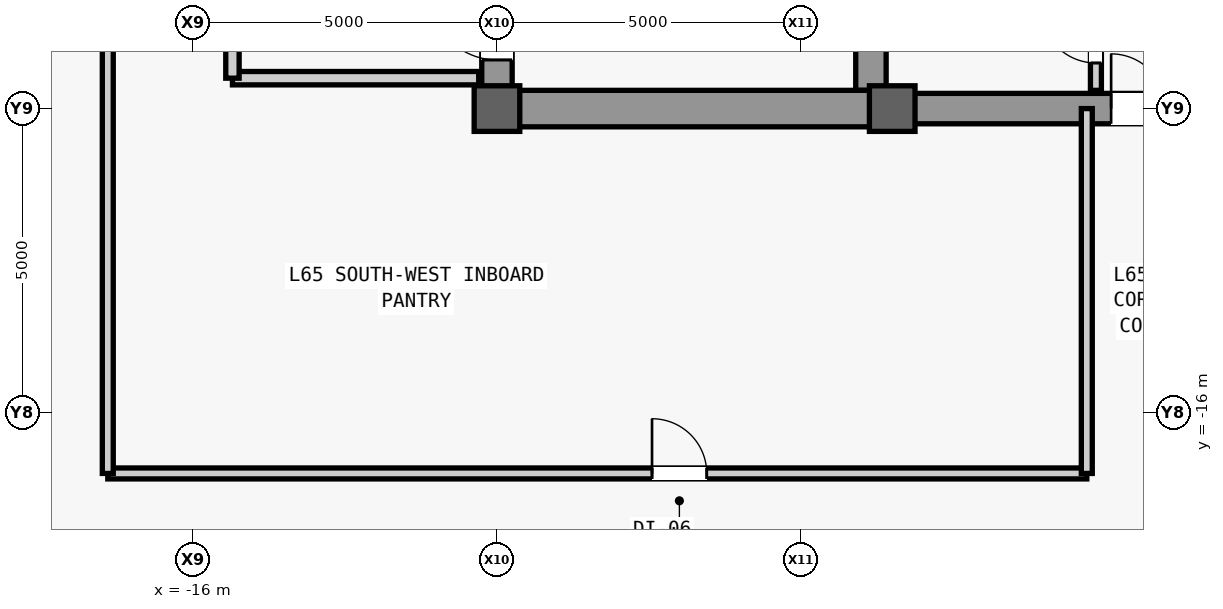
"""IFC4 building model, lengths in metres.
Left out: names, types, materials, properties, quantities, classifications, styles, units other than length and angle.
Written with IfcOpenShell. Run it as: python <this file> out.ifc"""

import sys

from ifc_helpers import new_model, si_unit, direction, frame, frame_2d, origin, origin_2d, place, context, subcontext, project, spatial, rectangle, extrude, source, transform, mapped, element, fill, save


model = new_model("IFC4")
c1 = context("Model", 3, precision=1e-05, world=origin(), true_north=direction((0.0, 1.0)))
c2 = subcontext(c1, "Body", "Model", "MODEL_VIEW")
j1 = project(units=[si_unit("LENGTHUNIT", "METRE"), si_unit("PLANEANGLEUNIT", "RADIAN")], contexts=[c1])
p1 = place(None, origin())
s1 = spatial("IfcSite", under=j1, at=p1, CompositionType="ELEMENT")
p2 = place(p1, origin())
s2 = spatial("IfcBuilding", under=s1, at=p2, CompositionType="ELEMENT")
p3 = place(p2, frame((0.0, 0.0, 277.5)))
s3 = spatial("IfcBuildingStorey", under=s2, at=p3, CompositionType="ELEMENT", Elevation=277.5)
m1 = source(origin(), c2, "Body", "SweptSolid", [
    extrude(rectangle(XDim=22.0, YDim=0.5, at=frame_2d((11.0, 0.0))), origin(), (0.0, 0.0, 1.0), 3.78),
])
p4 = place(p3, frame((-11.0, -11.0, 0.0), z_axis=(0.0, 0.0, 1.0), x_axis=(0.0, 1.0, 0.0)))
e1 = element("IfcWall", 1, at=p4, inside=s3, PredefinedType="SHEAR", context=c2, shape_type="MappedRepresentation", body=[
    mapped(m1, transform((0.0, 0.0, 0.0), scale=1.0)),
])
m2 = source(origin(), c2, "Body", "SweptSolid", [
    extrude(rectangle(XDim=1.1, YDim=2.2, at=frame_2d((0.55, 1.1))), frame((0.0, 0.26, 0.0), z_axis=(0.0, -1.0, 0.0), x_axis=(1.0, 0.0, 0.0)), (0.0, 0.0, 1.0), 0.52),
])
p5 = place(p4, frame((0.8, 0.0, 0.0)))
e2 = element("IfcOpeningElement", 2, at=p5, cuts=e1, PredefinedType="OPENING", context=c2, shape_type="MappedRepresentation", body=[
    mapped(m2, transform((0.0, 0.0, 0.0), scale=1.0)),
])
p6 = place(p4, frame((12.5, 0.0, 0.0)))
e3 = element("IfcOpeningElement", 3, at=p6, cuts=e1, PredefinedType="OPENING", context=c2, shape_type="MappedRepresentation", body=[
    mapped(m2, transform((0.0, 0.0, 0.0), scale=1.0)),
])
m3 = source(origin(), c2, "Body", "SweptSolid", [
    extrude(rectangle(XDim=0.9, YDim=2.15, at=frame_2d((0.45, 1.075))), frame((0.0, 0.26, 0.0), z_axis=(0.0, -1.0, 0.0), x_axis=(1.0, 0.0, 0.0)), (0.0, 0.0, 1.0), 0.52),
])
p7 = place(p4, frame((6.2, 0.0, 0.0)))
e4 = element("IfcOpeningElement", 4, at=p7, cuts=e1, PredefinedType="OPENING", context=c2, shape_type="MappedRepresentation", body=[
    mapped(m3, transform((0.0, 0.0, 0.0), scale=1.0)),
])
p8 = place(p4, frame((8.525, 0.0, 0.0)))
e5 = element("IfcOpeningElement", 5, at=p8, cuts=e1, PredefinedType="OPENING", context=c2, shape_type="MappedRepresentation", body=[
    mapped(m3, transform((0.0, 0.0, 0.0), scale=1.0)),
])
m4 = source(origin(), c2, "Body", "SweptSolid", [
    extrude(rectangle(XDim=1.2, YDim=2.3, at=frame_2d((0.6, 1.15))), frame((0.0, 0.26, 0.0), z_axis=(0.0, -1.0, 0.0), x_axis=(1.0, 0.0, 0.0)), (0.0, 0.0, 1.0), 0.52),
])
p9 = place(p4, frame((14.6, 0.0, 0.0)))
e6 = element("IfcOpeningElement", 6, at=p9, cuts=e1, PredefinedType="OPENING", context=c2, shape_type="MappedRepresentation", body=[
    mapped(m4, transform((0.0, 0.0, 0.0), scale=1.0)),
])
p10 = place(p4, frame((18.2, 0.0, 0.0)))
e7 = element("IfcOpeningElement", 7, at=p10, cuts=e1, PredefinedType="OPENING", context=c2, shape_type="MappedRepresentation", body=[
    mapped(m4, transform((0.0, 0.0, 0.0), scale=1.0)),
])
m5 = source(origin(), c2, "Body", "SweptSolid", [
    extrude(rectangle(XDim=1.3, YDim=2.3, at=frame_2d((0.65, 1.15))), frame((0.0, 0.26, 0.0), z_axis=(0.0, -1.0, 0.0), x_axis=(1.0, 0.0, 0.0)), (0.0, 0.0, 1.0), 0.52),
])
p11 = place(p4, frame((2.7, 0.0, 0.0)))
e8 = element("IfcOpeningElement", 8, at=p11, cuts=e1, PredefinedType="OPENING", context=c2, shape_type="MappedRepresentation", body=[
    mapped(m5, transform((0.0, 0.0, 0.0), scale=1.0)),
])
m6 = source(origin(), c2, "Body", "SweptSolid", [
    extrude(rectangle(XDim=21.4, YDim=0.5, at=frame_2d((10.7, 0.0))), origin(), (0.0, 0.0, 1.0), 3.78),
])
p12 = place(p3, frame((-4.85, -10.7, 0.0), z_axis=(0.0, 0.0, 1.0), x_axis=(0.0, 1.0, 0.0)))
e9 = element("IfcWall", 9, at=p12, inside=s3, PredefinedType="SHEAR", context=c2, shape_type="MappedRepresentation", body=[
    mapped(m6, transform((0.0, 0.0, 0.0), scale=1.0)),
])
m7 = source(origin(), c2, "Body", "SweptSolid", [
    extrude(rectangle(XDim=5.9, YDim=0.6, at=frame_2d((2.95, 0.0))), origin(), (0.0, 0.0, 1.0), 3.78),
])
p13 = place(p3, frame((-10.75, -11.0, 0.0), z_axis=(0.0, 0.0, 1.0), x_axis=(1.0, 0.0, 0.0)))
e10 = element("IfcWall", 10, at=p13, inside=s3, PredefinedType="SHEAR", context=c2, shape_type="MappedRepresentation", body=[
    mapped(m7, transform((0.0, 0.0, 0.0), scale=1.0)),
])
m8 = source(origin(), c2, "Body", "SweptSolid", [
    extrude(rectangle(XDim=9.2, YDim=0.5, at=frame_2d((4.6, 0.0))), origin(), (0.0, 0.0, 1.0), 3.78),
])
p14 = place(p3, frame((-4.6, -11.0, 0.0), z_axis=(0.0, 0.0, 1.0), x_axis=(1.0, 0.0, 0.0)))
e11 = element("IfcWall", 11, at=p14, inside=s3, PredefinedType="SHEAR", context=c2, shape_type="MappedRepresentation", body=[
    mapped(m8, transform((0.0, 0.0, 0.0), scale=1.0)),
])
m9 = source(origin(), c2, "Body", "SweptSolid", [
    extrude(rectangle(XDim=1.8, YDim=2.25, at=frame_2d((0.9, 1.125))), frame((0.0, 0.26, 0.0), z_axis=(0.0, -1.0, 0.0), x_axis=(1.0, 0.0, 0.0)), (0.0, 0.0, 1.0), 0.52),
])
p15 = place(p14, frame((3.7, 0.0, 0.0)))
e12 = element("IfcOpeningElement", 12, at=p15, cuts=e11, PredefinedType="OPENING", context=c2, shape_type="MappedRepresentation", body=[
    mapped(m9, transform((0.0, 0.0, 0.0), scale=1.0)),
])
m10 = source(origin(), c2, "Body", "SweptSolid", [
    extrude(rectangle(XDim=0.75, YDim=0.75, at=origin_2d()), origin(), (0.0, 0.0, 1.0), 4.0),
])
for number, where, z_axis, x_axis in (
    (13, (-11.0, -11.0, 0.0), (0.0, 0.0, 1.0), (1.0, 0.0, 0.0)),
    (14, (-4.5, -11.0, 0.0), (0.0, 0.0, 1.0), (1.0, 0.0, 0.0)),
):
    element("IfcColumn", number, at=place(p3, frame(where, z_axis=z_axis, x_axis=x_axis)), inside=s3, PredefinedType="COLUMN", context=c2, shape_type="MappedRepresentation", body=[
        mapped(m10, transform((0.0, 0.0, 0.0), scale=1.0)),
    ])
m11 = source(origin(), c2, "Body", "SweptSolid", [
    extrude(rectangle(XDim=4.05, YDim=0.22, at=frame_2d((2.025, 0.0))), origin(), (0.0, 0.0, 1.0), 3.78),
])
p16 = place(p3, frame((-15.35, -10.5, 0.0), z_axis=(0.0, 0.0, 1.0), x_axis=(1.0, 0.0, 0.0)))
e15 = element("IfcWall", 15, at=p16, inside=s3, PredefinedType="PARTITIONING", context=c2, shape_type="MappedRepresentation", body=[
    mapped(m11, transform((0.0, 0.0, 0.0), scale=1.0)),
])
m12 = source(origin(), c2, "Body", "SweptSolid", [
    extrude(rectangle(XDim=4.4, YDim=0.22, at=frame_2d((2.2, 0.0))), origin(), (0.0, 0.0, 1.0), 3.78),
])
p17 = place(p3, frame((-15.35, -10.5, 0.0), z_axis=(0.0, 0.0, 1.0), x_axis=(0.0, 1.0, 0.0)))
e16 = element("IfcWall", 16, at=p17, inside=s3, PredefinedType="PARTITIONING", context=c2, shape_type="MappedRepresentation", body=[
    mapped(m12, transform((0.0, 0.0, 0.0), scale=1.0)),
])
m13 = source(origin(), c2, "Body", "SweptSolid", [
    extrude(rectangle(XDim=1.2, YDim=2.2, at=frame_2d((0.6, 1.1))), frame((0.0, 0.12, 0.0), z_axis=(0.0, -1.0, 0.0), x_axis=(1.0, 0.0, 0.0)), (0.0, 0.0, 1.0), 0.24),
])
p18 = place(p17, frame((1.6, 0.0, 0.0)))
e17 = element("IfcOpeningElement", 17, at=p18, cuts=e16, PredefinedType="OPENING", context=c2, shape_type="MappedRepresentation", body=[
    mapped(m13, transform((0.0, 0.0, 0.0), scale=1.0)),
])
m14 = source(origin(), c2, "Body", "SweptSolid", [
    extrude(rectangle(XDim=5.4, YDim=0.18, at=frame_2d((2.7, 0.0))), origin(), (0.0, 0.0, 1.0), 3.78),
])
p19 = place(p3, frame((-1.15, -10.7, 0.0), z_axis=(0.0, 0.0, 1.0), x_axis=(0.0, 1.0, 0.0)))
e18 = element("IfcWall", 18, at=p19, inside=s3, PredefinedType="PARTITIONING", context=c2, shape_type="MappedRepresentation", body=[
    mapped(m14, transform((0.0, 0.0, 0.0), scale=1.0)),
])
m15 = source(origin(), c2, "Body", "SweptSolid", [
    extrude(rectangle(XDim=0.9, YDim=2.15, at=frame_2d((0.45, 1.075))), frame((0.0, 0.1, 0.0), z_axis=(0.0, -1.0, 0.0), x_axis=(1.0, 0.0, 0.0)), (0.0, 0.0, 1.0), 0.2),
])
p20 = place(p19, frame((0.45, 0.0, 0.0)))
e19 = element("IfcOpeningElement", 19, at=p20, cuts=e18, PredefinedType="OPENING", context=c2, shape_type="MappedRepresentation", body=[
    mapped(m15, transform((0.0, 0.0, 0.0), scale=1.0)),
])
p21 = place(p19, frame((2.25, 0.0, 0.0)))
e20 = element("IfcOpeningElement", 20, at=p21, cuts=e18, PredefinedType="OPENING", context=c2, shape_type="MappedRepresentation", body=[
    mapped(m15, transform((0.0, 0.0, 0.0), scale=1.0)),
])
p22 = place(p19, frame((4.05, 0.0, 0.0)))
e21 = element("IfcOpeningElement", 21, at=p22, cuts=e18, PredefinedType="OPENING", context=c2, shape_type="MappedRepresentation", body=[
    mapped(m15, transform((0.0, 0.0, 0.0), scale=1.0)),
])
m16 = source(origin(), c2, "Body", "SweptSolid", [
    extrude(rectangle(XDim=16.1, YDim=0.18, at=frame_2d((8.05, 0.0))), origin(), (0.0, 0.0, 1.0), 3.78),
])
p23 = place(p3, frame((-17.4, -17.0, 0.0), z_axis=(0.0, 0.0, 1.0), x_axis=(1.0, 0.0, 0.0)))
e22 = element("IfcWall", 22, at=p23, inside=s3, PredefinedType="PARTITIONING", context=c2, shape_type="MappedRepresentation", body=[
    mapped(m16, transform((0.0, 0.0, 0.0), scale=1.0)),
])
p24 = place(p23, frame((8.95, 0.0, 0.0)))
e23 = element("IfcOpeningElement", 23, at=p24, cuts=e22, PredefinedType="OPENING", context=c2, shape_type="MappedRepresentation", body=[
    mapped(m15, transform((0.0, 0.0, 0.0), scale=1.0)),
])
m17 = source(origin(), c2, "Body", "SweptSolid", [
    extrude(rectangle(XDim=7.2, YDim=0.18, at=frame_2d((3.6, 0.0))), origin(), (0.0, 0.0, 1.0), 3.78),
])
p25 = place(p3, frame((-17.4, -17.0, 0.0), z_axis=(0.0, 0.0, 1.0), x_axis=(0.0, 1.0, 0.0)))
e24 = element("IfcWall", 24, at=p25, inside=s3, PredefinedType="PARTITIONING", context=c2, shape_type="MappedRepresentation", body=[
    mapped(m17, transform((0.0, 0.0, 0.0), scale=1.0)),
])
m18 = source(origin(), c2, "Body", "SweptSolid", [
    extrude(rectangle(XDim=6.0, YDim=0.18, at=frame_2d((3.0, 0.0))), origin(), (0.0, 0.0, 1.0), 3.78),
])
p26 = place(p3, frame((-1.3, -17.0, 0.0), z_axis=(0.0, 0.0, 1.0), x_axis=(0.0, 1.0, 0.0)))
e25 = element("IfcWall", 25, at=p26, inside=s3, PredefinedType="PARTITIONING", context=c2, shape_type="MappedRepresentation", body=[
    mapped(m18, transform((0.0, 0.0, 0.0), scale=1.0)),
])
m19 = source(origin(), c2, "Body", "SweptSolid", [
    extrude(rectangle(XDim=1.1, YDim=2.2, at=frame_2d((0.55, 1.1))), frame((0.0, 0.025, 0.0), z_axis=(0.0, -1.0, 0.0), x_axis=(1.0, 0.0, 0.0)), (0.0, 0.0, 1.0), 0.05),
])
p27 = place(p5, origin())
e26 = element("IfcDoor", 26, at=p27, inside=s3, OperationType="SINGLE_SWING_RIGHT", PredefinedType="DOOR", context=c2, shape_type="MappedRepresentation", body=[
    mapped(m19, transform((0.0, 0.0, 0.0), scale=1.0)),
])
fill(e2, e26)
m20 = source(origin(), c2, "Body", "SweptSolid", [
    extrude(rectangle(XDim=0.9, YDim=2.15, at=frame_2d((0.45, 1.075))), frame((0.0, 0.025, 0.0), z_axis=(0.0, -1.0, 0.0), x_axis=(1.0, 0.0, 0.0)), (0.0, 0.0, 1.0), 0.05),
])
p28 = place(p20, origin())
e27 = element("IfcDoor", 27, at=p28, inside=s3, OperationType="SINGLE_SWING_RIGHT", PredefinedType="DOOR", context=c2, shape_type="MappedRepresentation", body=[
    mapped(m20, transform((0.0, 0.0, 0.0), scale=1.0)),
])
fill(e19, e27)
m21 = source(origin(), c2, "Body", "SweptSolid", [
    extrude(rectangle(XDim=1.8, YDim=2.25, at=frame_2d((0.9, 1.125))), frame((0.0, 0.025, 0.0), z_axis=(0.0, -1.0, 0.0), x_axis=(1.0, 0.0, 0.0)), (0.0, 0.0, 1.0), 0.05),
])
p29 = place(p15, origin())
e28 = element("IfcDoor", 28, at=p29, inside=s3, OperationType="SINGLE_SWING_LEFT", PredefinedType="DOOR", context=c2, shape_type="MappedRepresentation", body=[
    mapped(m21, transform((0.0, 0.0, 0.0), scale=1.0)),
])
fill(e12, e28)
p30 = place(p24, origin())
e29 = element("IfcDoor", 29, at=p30, inside=s3, OperationType="SINGLE_SWING_LEFT", PredefinedType="DOOR", context=c2, shape_type="MappedRepresentation", body=[
    mapped(m20, transform((0.0, 0.0, 0.0), scale=1.0)),
])
fill(e23, e29)
save(model, sys.argv[1])
